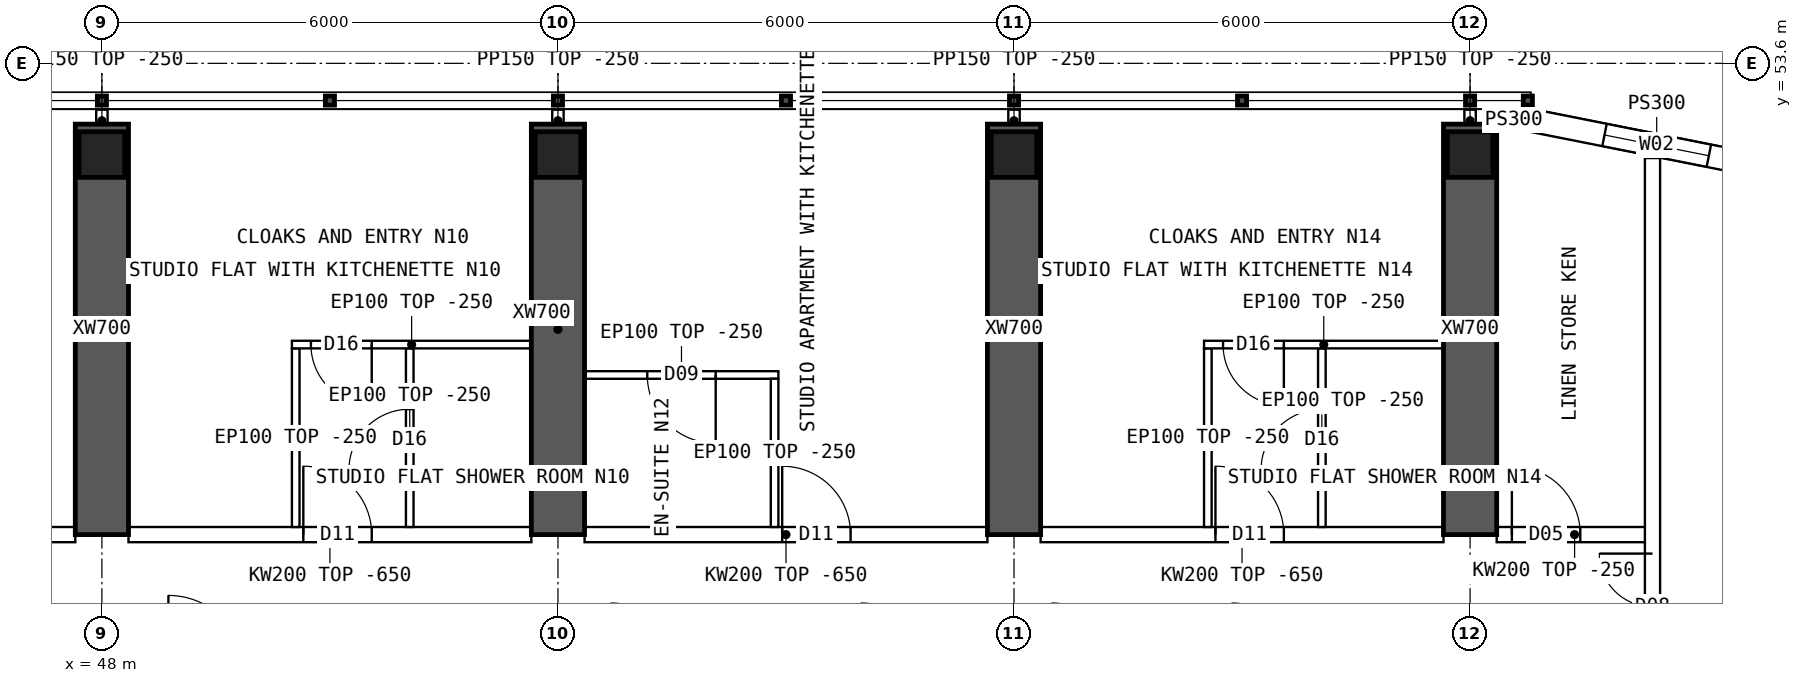
"""IFC4 building model, lengths in metres.
Left out: names, types, materials, properties, quantities, classifications, styles, units other than length and angle.
Written with IfcOpenShell. Run it as: python <this file> out.ifc"""

import sys

from ifc_helpers import new_model, si_unit, direction, frame, frame_2d, origin, origin_2d, place, context, subcontext, project, spatial, polyline, rectangle, hollow_rectangle, outline, extrude, element, fill, save


model = new_model("IFC4")
c1 = context("Model", 3, precision=1e-05, world=origin(), true_north=direction((0.0, 1.0)))
c2 = subcontext(c1, "Body", "Model", "MODEL_VIEW")
j1 = project(units=[si_unit("LENGTHUNIT", "METRE"), si_unit("PLANEANGLEUNIT", "RADIAN")], contexts=[c1])
p1 = place(None, origin())
s1 = spatial("IfcSite", under=j1, at=p1, CompositionType="ELEMENT")
p2 = place(p1, origin())
s2 = spatial("IfcBuilding", under=s1, at=p2, CompositionType="ELEMENT")
p3 = place(p2, frame((0.0, 0.0, 231.55)))
s3 = spatial("IfcBuildingStorey", under=s2, at=p3, CompositionType="ELEMENT", Elevation=231.55)
for number, where, z_axis, x_axis in (
    (1, (48.0, 52.4, 0.0), (0.0, 0.0, 1.0), (1.0, 0.0, 0.0)),
    (2, (54.0, 52.4, 0.0), (0.0, 0.0, 1.0), (1.0, 0.0, 0.0)),
    (3, (60.0, 52.4, 0.0), (0.0, 0.0, 1.0), (1.0, 0.0, 0.0)),
    (4, (66.0, 52.4, 0.0), (0.0, 0.0, 1.0), (1.0, 0.0, 0.0)),
):
    element("IfcColumn", number, at=place(p3, frame(where, z_axis=z_axis, x_axis=x_axis)), inside=s3, PredefinedType="COLUMN", context=c2, shape_type="SweptSolid", body=[
        extrude(hollow_rectangle(XDim=0.6, YDim=0.6, WallThickness=0.06, at=origin_2d()), origin(), (0.0, 0.0, 1.0), 3.75),
    ])
for number, where, z_axis, x_axis in (
    (5, (48.0, 47.4, 0.0), (0.0, 0.0, 1.0), (0.0, 1.0, 0.0)),
    (6, (54.0, 47.4, 0.0), (0.0, 0.0, 1.0), (0.0, 1.0, 0.0)),
    (7, (60.0, 47.4, 0.0), (0.0, 0.0, 1.0), (0.0, 1.0, 0.0)),
    (8, (66.0, 47.4, 0.0), (0.0, 0.0, 1.0), (0.0, 1.0, 0.0)),
):
    element("IfcWall", number, at=place(p3, frame(where, z_axis=z_axis, x_axis=x_axis)), inside=s3, PredefinedType="SHEAR", context=c2, shape_type="SweptSolid", body=[
        extrude(rectangle(XDim=5.4, YDim=0.7, at=frame_2d((2.7, 0.0))), origin(), (0.0, 0.0, 1.0), 3.75),
    ])
p4 = place(p3, frame((70.11, 52.192, 0.0), z_axis=(0.0, 0.0, 1.0), x_axis=(-0.98078325777, 0.195100490205, 0.0)))
e9 = element("IfcWall", 9, at=p4, inside=s3, PredefinedType="SOLIDWALL", context=c2, shape_type="SweptSolid", body=[
    extrude(outline(polyline([(-0.03, -0.15), (3.405, -0.15), (3.345, 0.15), (0.03, 0.15), (-0.03, -0.15)])), origin(), (0.0, 0.0, 1.0), 3.5),
])
p5 = place(p4, frame((0.988, 0.0, 0.9)))
e10 = element("IfcOpeningElement", 10, at=p5, cuts=e9, PredefinedType="OPENING", context=c2, shape_type="SweptSolid", body=[
    extrude(rectangle(XDim=1.4, YDim=1.8, at=frame_2d((0.7, 0.9))), frame((0.0, 0.16, 0.0), z_axis=(0.0, -1.0, 0.0), x_axis=(1.0, 0.0, 0.0)), (0.0, 0.0, 1.0), 0.32),
])
p6 = place(p3, frame((66.8, 52.85, 0.0), z_axis=(0.0, 0.0, 1.0), x_axis=(-1.0, 0.0, 0.0)))
e11 = element("IfcWall", 11, at=p6, inside=s3, PredefinedType="SOLIDWALL", context=c2, shape_type="SweptSolid", body=[
    extrude(rectangle(XDim=0.45, YDim=0.3, at=frame_2d((0.225, 0.0))), origin(), (0.0, 0.0, 1.0), 3.5),
])
p7 = place(p3, frame((42.35, 47.4, 0.0), z_axis=(0.0, 0.0, 1.0), x_axis=(1.0, 0.0, 0.0)))
e12 = element("IfcWall", 12, at=p7, inside=s3, PredefinedType="SOLIDWALL", context=c2, shape_type="SweptSolid", body=[
    extrude(outline(polyline([(0.0, 0.0), (5.3, 0.0), (5.3, 3.1), (0.0, 3.1), (0.0, 0.0)])), frame((0.0, 0.1, 0.0), z_axis=(0.0, -1.0, 0.0), x_axis=(1.0, 0.0, 0.0)), (0.0, 0.0, 1.0), 0.2),
])
p8 = place(p7, frame((2.6, 0.0, 0.0)))
e13 = element("IfcOpeningElement", 13, at=p8, cuts=e12, PredefinedType="OPENING", context=c2, shape_type="SweptSolid", body=[
    extrude(rectangle(XDim=0.9, YDim=2.1, at=frame_2d((0.45, 1.05))), frame((0.0, 0.11, 0.0), z_axis=(0.0, -1.0, 0.0), x_axis=(1.0, 0.0, 0.0)), (0.0, 0.0, 1.0), 0.22),
])
p9 = place(p3, frame((48.35, 47.4, 0.0), z_axis=(0.0, 0.0, 1.0), x_axis=(1.0, 0.0, 0.0)))
e14 = element("IfcWall", 14, at=p9, inside=s3, PredefinedType="SOLIDWALL", context=c2, shape_type="SweptSolid", body=[
    extrude(outline(polyline([(0.0, 0.0), (5.3, 0.0), (5.3, 3.1), (0.0, 3.1), (0.0, 0.0)])), frame((0.0, 0.1, 0.0), z_axis=(0.0, -1.0, 0.0), x_axis=(1.0, 0.0, 0.0)), (0.0, 0.0, 1.0), 0.2),
])
p10 = place(p9, frame((2.3, 0.0, 0.0)))
e15 = element("IfcOpeningElement", 15, at=p10, cuts=e14, PredefinedType="OPENING", context=c2, shape_type="SweptSolid", body=[
    extrude(rectangle(XDim=0.9, YDim=2.1, at=frame_2d((0.45, 1.05))), frame((0.0, 0.11, 0.0), z_axis=(0.0, -1.0, 0.0), x_axis=(1.0, 0.0, 0.0)), (0.0, 0.0, 1.0), 0.22),
])
p11 = place(p3, frame((54.35, 47.4, 0.0), z_axis=(0.0, 0.0, 1.0), x_axis=(1.0, 0.0, 0.0)))
e16 = element("IfcWall", 16, at=p11, inside=s3, PredefinedType="SOLIDWALL", context=c2, shape_type="SweptSolid", body=[
    extrude(outline(polyline([(0.0, 0.0), (5.3, 0.0), (5.3, 3.1), (0.0, 3.1), (0.0, 0.0)])), frame((0.0, 0.1, 0.0), z_axis=(0.0, -1.0, 0.0), x_axis=(1.0, 0.0, 0.0)), (0.0, 0.0, 1.0), 0.2),
])
p12 = place(p11, frame((2.6, 0.0, 0.0)))
e17 = element("IfcOpeningElement", 17, at=p12, cuts=e16, PredefinedType="OPENING", context=c2, shape_type="SweptSolid", body=[
    extrude(rectangle(XDim=0.9, YDim=2.1, at=frame_2d((0.45, 1.05))), frame((0.0, 0.11, 0.0), z_axis=(0.0, -1.0, 0.0), x_axis=(1.0, 0.0, 0.0)), (0.0, 0.0, 1.0), 0.22),
])
p13 = place(p3, frame((60.35, 47.4, 0.0), z_axis=(0.0, 0.0, 1.0), x_axis=(1.0, 0.0, 0.0)))
e18 = element("IfcWall", 18, at=p13, inside=s3, PredefinedType="SOLIDWALL", context=c2, shape_type="SweptSolid", body=[
    extrude(outline(polyline([(0.0, 0.0), (5.3, 0.0), (5.3, 3.1), (0.0, 3.1), (0.0, 0.0)])), frame((0.0, 0.1, 0.0), z_axis=(0.0, -1.0, 0.0), x_axis=(1.0, 0.0, 0.0)), (0.0, 0.0, 1.0), 0.2),
])
p14 = place(p13, frame((2.3, 0.0, 0.0)))
e19 = element("IfcOpeningElement", 19, at=p14, cuts=e18, PredefinedType="OPENING", context=c2, shape_type="SweptSolid", body=[
    extrude(rectangle(XDim=0.9, YDim=2.1, at=frame_2d((0.45, 1.05))), frame((0.0, 0.11, 0.0), z_axis=(0.0, -1.0, 0.0), x_axis=(1.0, 0.0, 0.0)), (0.0, 0.0, 1.0), 0.22),
])
p15 = place(p3, frame((66.35, 47.4, 0.0), z_axis=(0.0, 0.0, 1.0), x_axis=(1.0, 0.0, 0.0)))
e20 = element("IfcWall", 20, at=p15, inside=s3, PredefinedType="SOLIDWALL", context=c2, shape_type="SweptSolid", body=[
    extrude(rectangle(XDim=2.05, YDim=0.2, at=frame_2d((1.025, 0.0))), origin(), (0.0, 0.0, 1.0), 3.5),
])
p16 = place(p15, frame((0.2, 0.0, 0.0)))
e21 = element("IfcOpeningElement", 21, at=p16, cuts=e20, PredefinedType="OPENING", context=c2, shape_type="SweptSolid", body=[
    extrude(rectangle(XDim=0.9, YDim=2.1, at=frame_2d((0.45, 1.05))), frame((0.0, 0.11, 0.0), z_axis=(0.0, -1.0, 0.0), x_axis=(1.0, 0.0, 0.0)), (0.0, 0.0, 1.0), 0.22),
])
p17 = place(p3, frame((50.5, 49.9, 0.0), z_axis=(0.0, 0.0, 1.0), x_axis=(1.0, 0.0, 0.0)))
e22 = element("IfcWall", 22, at=p17, inside=s3, PredefinedType="PARTITIONING", context=c2, shape_type="SweptSolid", body=[
    extrude(rectangle(XDim=3.15, YDim=0.1, at=frame_2d((1.575, 0.0))), origin(), (0.0, 0.0, 1.0), 3.5),
])
p18 = place(p17, frame((0.25, 0.0, 0.0)))
e23 = element("IfcOpeningElement", 23, at=p18, cuts=e22, PredefinedType="OPENING", context=c2, shape_type="SweptSolid", body=[
    extrude(rectangle(XDim=0.8, YDim=2.1, at=frame_2d((0.4, 1.05))), frame((0.0, 0.06, 0.0), z_axis=(0.0, -1.0, 0.0), x_axis=(1.0, 0.0, 0.0)), (0.0, 0.0, 1.0), 0.12),
])
p19 = place(p3, frame((50.55, 49.85, 0.0), z_axis=(0.0, 0.0, 1.0), x_axis=(0.0, -1.0, 0.0)))
e24 = element("IfcWall", 24, at=p19, inside=s3, PredefinedType="PARTITIONING", context=c2, shape_type="SweptSolid", body=[
    extrude(outline(polyline([(0.0, 0.0), (2.35, 0.0), (2.35, 3.1), (2.302, 3.1), (2.3, 3.5), (0.0, 3.5), (0.0, 0.0)])), frame((0.0, 0.05, 0.0), z_axis=(0.0, -1.0, 0.0), x_axis=(1.0, 0.0, 0.0)), (0.0, 0.0, 1.0), 0.1),
])
p20 = place(p3, frame((52.05, 49.85, 0.0), z_axis=(0.0, 0.0, 1.0), x_axis=(0.0, -1.0, 0.0)))
e25 = element("IfcWall", 25, at=p20, inside=s3, PredefinedType="PARTITIONING", context=c2, shape_type="SweptSolid", body=[
    extrude(outline(polyline([(0.0, 0.0), (2.35, 0.0), (2.35, 3.1), (2.302, 3.1), (2.3, 3.5), (0.0, 3.5), (0.0, 0.0)])), frame((0.0, 0.05, 0.0), z_axis=(0.0, -1.0, 0.0), x_axis=(1.0, 0.0, 0.0)), (0.0, 0.0, 1.0), 0.1),
])
p21 = place(p20, frame((0.8, 0.0, 0.0)))
e26 = element("IfcOpeningElement", 26, at=p21, cuts=e25, PredefinedType="OPENING", context=c2, shape_type="SweptSolid", body=[
    extrude(rectangle(XDim=0.8, YDim=2.1, at=frame_2d((0.4, 1.05))), frame((0.0, 0.06, 0.0), z_axis=(0.0, -1.0, 0.0), x_axis=(1.0, 0.0, 0.0)), (0.0, 0.0, 1.0), 0.12),
])
p22 = place(p3, frame((54.35, 49.5, 0.0), z_axis=(0.0, 0.0, 1.0), x_axis=(1.0, 0.0, 0.0)))
e27 = element("IfcWall", 27, at=p22, inside=s3, PredefinedType="PARTITIONING", context=c2, shape_type="SweptSolid", body=[
    extrude(rectangle(XDim=2.55, YDim=0.1, at=frame_2d((1.275, 0.0))), origin(), (0.0, 0.0, 1.0), 3.5),
])
p23 = place(p22, frame((0.825, 0.0, 0.0)))
e28 = element("IfcOpeningElement", 28, at=p23, cuts=e27, PredefinedType="OPENING", context=c2, shape_type="SweptSolid", body=[
    extrude(rectangle(XDim=0.9, YDim=2.1, at=frame_2d((0.45, 1.05))), frame((0.0, 0.06, 0.0), z_axis=(0.0, -1.0, 0.0), x_axis=(1.0, 0.0, 0.0)), (0.0, 0.0, 1.0), 0.12),
])
p24 = place(p3, frame((56.85, 49.45, 0.0), z_axis=(0.0, 0.0, 1.0), x_axis=(0.0, -1.0, 0.0)))
e29 = element("IfcWall", 29, at=p24, inside=s3, PredefinedType="PARTITIONING", context=c2, shape_type="SweptSolid", body=[
    extrude(outline(polyline([(0.0, 0.0), (1.95, 0.0), (1.95, 3.1), (1.902, 3.1), (1.9, 3.5), (0.0, 3.5), (0.0, 0.0)])), frame((0.0, 0.05, 0.0), z_axis=(0.0, -1.0, 0.0), x_axis=(1.0, 0.0, 0.0)), (0.0, 0.0, 1.0), 0.1),
])
p25 = place(p3, frame((62.5, 49.9, 0.0), z_axis=(0.0, 0.0, 1.0), x_axis=(1.0, 0.0, 0.0)))
e30 = element("IfcWall", 30, at=p25, inside=s3, PredefinedType="PARTITIONING", context=c2, shape_type="SweptSolid", body=[
    extrude(rectangle(XDim=3.15, YDim=0.1, at=frame_2d((1.575, 0.0))), origin(), (0.0, 0.0, 1.0), 3.5),
])
p26 = place(p25, frame((0.25, 0.0, 0.0)))
e31 = element("IfcOpeningElement", 31, at=p26, cuts=e30, PredefinedType="OPENING", context=c2, shape_type="SweptSolid", body=[
    extrude(rectangle(XDim=0.8, YDim=2.1, at=frame_2d((0.4, 1.05))), frame((0.0, 0.06, 0.0), z_axis=(0.0, -1.0, 0.0), x_axis=(1.0, 0.0, 0.0)), (0.0, 0.0, 1.0), 0.12),
])
p27 = place(p3, frame((62.55, 49.85, 0.0), z_axis=(0.0, 0.0, 1.0), x_axis=(0.0, -1.0, 0.0)))
e32 = element("IfcWall", 32, at=p27, inside=s3, PredefinedType="PARTITIONING", context=c2, shape_type="SweptSolid", body=[
    extrude(outline(polyline([(0.0, 0.0), (2.35, 0.0), (2.35, 3.1), (2.302, 3.1), (2.3, 3.5), (0.0, 3.5), (0.0, 0.0)])), frame((0.0, 0.05, 0.0), z_axis=(0.0, -1.0, 0.0), x_axis=(1.0, 0.0, 0.0)), (0.0, 0.0, 1.0), 0.1),
])
p28 = place(p3, frame((64.05, 49.85, 0.0), z_axis=(0.0, 0.0, 1.0), x_axis=(0.0, -1.0, 0.0)))
e33 = element("IfcWall", 33, at=p28, inside=s3, PredefinedType="PARTITIONING", context=c2, shape_type="SweptSolid", body=[
    extrude(outline(polyline([(0.0, 0.0), (2.35, 0.0), (2.35, 3.1), (2.302, 3.1), (2.3, 3.5), (0.0, 3.5), (0.0, 0.0)])), frame((0.0, 0.05, 0.0), z_axis=(0.0, -1.0, 0.0), x_axis=(1.0, 0.0, 0.0)), (0.0, 0.0, 1.0), 0.1),
])
p29 = place(p28, frame((0.8, 0.0, 0.0)))
e34 = element("IfcOpeningElement", 34, at=p29, cuts=e33, PredefinedType="OPENING", context=c2, shape_type="SweptSolid", body=[
    extrude(rectangle(XDim=0.8, YDim=2.1, at=frame_2d((0.4, 1.05))), frame((0.0, 0.06, 0.0), z_axis=(0.0, -1.0, 0.0), x_axis=(1.0, 0.0, 0.0)), (0.0, 0.0, 1.0), 0.12),
])
p30 = place(p3, frame((68.4, 11.646, 0.0), z_axis=(0.0, 0.0, 1.0), x_axis=(0.0, 1.0, 0.0)))
e35 = element("IfcWall", 35, at=p30, inside=s3, PredefinedType="SOLIDWALL", context=c2, shape_type="SweptSolid", body=[
    extrude(rectangle(XDim=40.708, YDim=0.2, at=frame_2d((20.354, 0.0))), origin(), (0.0, 0.0, 1.0), 3.5),
])
p31 = place(p30, frame((13.434, 0.0, 0.0)))
e36 = element("IfcOpeningElement", 36, at=p31, cuts=e35, PredefinedType="OPENING", context=c2, shape_type="SweptSolid", body=[
    extrude(rectangle(XDim=1.2, YDim=2.1, at=frame_2d((0.6, 1.05))), frame((0.0, 0.11, 0.0), z_axis=(0.0, -1.0, 0.0), x_axis=(1.0, 0.0, 0.0)), (0.0, 0.0, 1.0), 0.22),
])
p32 = place(p30, frame((21.194, 0.0, 0.0)))
e37 = element("IfcOpeningElement", 37, at=p32, cuts=e35, PredefinedType="OPENING", context=c2, shape_type="SweptSolid", body=[
    extrude(rectangle(XDim=1.2, YDim=2.1, at=frame_2d((0.6, 1.05))), frame((0.0, 0.11, 0.0), z_axis=(0.0, -1.0, 0.0), x_axis=(1.0, 0.0, 0.0)), (0.0, 0.0, 1.0), 0.22),
])
p33 = place(p30, frame((5.104, 0.0, 0.0)))
e38 = element("IfcOpeningElement", 38, at=p33, cuts=e35, PredefinedType="OPENING", context=c2, shape_type="SweptSolid", body=[
    extrude(rectangle(XDim=1.4, YDim=2.1, at=frame_2d((0.7, 1.05))), frame((0.0, 0.11, 0.0), z_axis=(0.0, -1.0, 0.0), x_axis=(1.0, 0.0, 0.0)), (0.0, 0.0, 1.0), 0.22),
])
p34 = place(p30, frame((34.104, 0.0, 0.0)))
e39 = element("IfcOpeningElement", 39, at=p34, cuts=e35, PredefinedType="OPENING", context=c2, shape_type="SweptSolid", body=[
    extrude(rectangle(XDim=1.4, YDim=2.1, at=frame_2d((0.7, 1.05))), frame((0.0, 0.11, 0.0), z_axis=(0.0, -1.0, 0.0), x_axis=(1.0, 0.0, 0.0)), (0.0, 0.0, 1.0), 0.22),
])
for number, where, z_axis, x_axis in (
    (40, (48.0, 52.7, 0.0), (0.0, 0.0, 1.0), (0.0, 1.0, 0.0)),
    (41, (54.0, 52.7, 0.0), (0.0, 0.0, 1.0), (0.0, 1.0, 0.0)),
    (42, (60.0, 52.7, 0.0), (0.0, 0.0, 1.0), (0.0, 1.0, 0.0)),
    (43, (66.0, 52.7, 0.0), (0.0, 0.0, 1.0), (0.0, 1.0, 0.0)),
):
    element("IfcWall", number, at=place(p3, frame(where, z_axis=z_axis, x_axis=x_axis)), inside=s3, PredefinedType="PARTITIONING", context=c2, shape_type="SweptSolid", body=[
        extrude(rectangle(XDim=0.29, YDim=0.15, at=frame_2d((0.145, 0.0))), origin(), (0.0, 0.0, 1.0), 3.5),
    ])
p35 = place(p5, origin())
e44 = element("IfcWindow", 44, at=p35, inside=s3, PartitioningType="SINGLE_PANEL", PredefinedType="WINDOW", context=c2, shape_type="SweptSolid", body=[
    extrude(rectangle(XDim=1.4, YDim=1.8, at=frame_2d((0.7, 0.9))), frame((0.0, 0.03, 0.0), z_axis=(0.0, -1.0, 0.0), x_axis=(1.0, 0.0, 0.0)), (0.0, 0.0, 1.0), 0.06),
])
fill(e10, e44)
p36 = place(p18, origin())
e45 = element("IfcDoor", 45, at=p36, inside=s3, OperationType="SINGLE_SWING_RIGHT", PredefinedType="DOOR", context=c2, shape_type="SweptSolid", body=[
    extrude(rectangle(XDim=0.8, YDim=2.1, at=frame_2d((0.4, 1.05))), frame((0.0, 0.025, 0.0), z_axis=(0.0, -1.0, 0.0), x_axis=(1.0, 0.0, 0.0)), (0.0, 0.0, 1.0), 0.05),
])
fill(e23, e45)
p37 = place(p21, origin())
e46 = element("IfcDoor", 46, at=p37, inside=s3, OperationType="SINGLE_SWING_RIGHT", PredefinedType="DOOR", context=c2, shape_type="SweptSolid", body=[
    extrude(rectangle(XDim=0.8, YDim=2.1, at=frame_2d((0.4, 1.05))), frame((0.0, 0.025, 0.0), z_axis=(0.0, -1.0, 0.0), x_axis=(1.0, 0.0, 0.0)), (0.0, 0.0, 1.0), 0.05),
])
fill(e26, e46)
p38 = place(p10, origin())
e47 = element("IfcDoor", 47, at=p38, inside=s3, OperationType="SINGLE_SWING_LEFT", PredefinedType="DOOR", context=c2, shape_type="SweptSolid", body=[
    extrude(rectangle(XDim=0.9, YDim=2.1, at=frame_2d((0.45, 1.05))), frame((0.0, 0.025, 0.0), z_axis=(0.0, -1.0, 0.0), x_axis=(1.0, 0.0, 0.0)), (0.0, 0.0, 1.0), 0.05),
])
fill(e15, e47)
p39 = place(p23, origin())
e48 = element("IfcDoor", 48, at=p39, inside=s3, OperationType="SINGLE_SWING_RIGHT", PredefinedType="DOOR", context=c2, shape_type="SweptSolid", body=[
    extrude(rectangle(XDim=0.9, YDim=2.1, at=frame_2d((0.45, 1.05))), frame((0.0, 0.025, 0.0), z_axis=(0.0, -1.0, 0.0), x_axis=(1.0, 0.0, 0.0)), (0.0, 0.0, 1.0), 0.05),
])
fill(e28, e48)
p40 = place(p12, origin())
e49 = element("IfcDoor", 49, at=p40, inside=s3, OperationType="SINGLE_SWING_LEFT", PredefinedType="DOOR", context=c2, shape_type="SweptSolid", body=[
    extrude(rectangle(XDim=0.9, YDim=2.1, at=frame_2d((0.45, 1.05))), frame((0.0, 0.025, 0.0), z_axis=(0.0, -1.0, 0.0), x_axis=(1.0, 0.0, 0.0)), (0.0, 0.0, 1.0), 0.05),
])
fill(e17, e49)
p41 = place(p26, origin())
e50 = element("IfcDoor", 50, at=p41, inside=s3, OperationType="SINGLE_SWING_RIGHT", PredefinedType="DOOR", context=c2, shape_type="SweptSolid", body=[
    extrude(rectangle(XDim=0.8, YDim=2.1, at=frame_2d((0.4, 1.05))), frame((0.0, 0.025, 0.0), z_axis=(0.0, -1.0, 0.0), x_axis=(1.0, 0.0, 0.0)), (0.0, 0.0, 1.0), 0.05),
])
fill(e31, e50)
p42 = place(p29, origin())
e51 = element("IfcDoor", 51, at=p42, inside=s3, OperationType="SINGLE_SWING_RIGHT", PredefinedType="DOOR", context=c2, shape_type="SweptSolid", body=[
    extrude(rectangle(XDim=0.8, YDim=2.1, at=frame_2d((0.4, 1.05))), frame((0.0, 0.025, 0.0), z_axis=(0.0, -1.0, 0.0), x_axis=(1.0, 0.0, 0.0)), (0.0, 0.0, 1.0), 0.05),
])
fill(e34, e51)
p43 = place(p14, origin())
e52 = element("IfcDoor", 52, at=p43, inside=s3, OperationType="SINGLE_SWING_LEFT", PredefinedType="DOOR", context=c2, shape_type="SweptSolid", body=[
    extrude(rectangle(XDim=0.9, YDim=2.1, at=frame_2d((0.45, 1.05))), frame((0.0, 0.025, 0.0), z_axis=(0.0, -1.0, 0.0), x_axis=(1.0, 0.0, 0.0)), (0.0, 0.0, 1.0), 0.05),
])
fill(e19, e52)
p44 = place(p34, origin())
e53 = element("IfcDoor", 53, at=p44, inside=s3, OperationType="DOUBLE_DOOR_SINGLE_SWING", PredefinedType="DOOR", context=c2, shape_type="SweptSolid", body=[
    extrude(rectangle(XDim=1.4, YDim=2.1, at=frame_2d((0.7, 1.05))), frame((0.0, 0.025, 0.0), z_axis=(0.0, -1.0, 0.0), x_axis=(1.0, 0.0, 0.0)), (0.0, 0.0, 1.0), 0.05),
])
fill(e39, e53)
p45 = place(p16, origin())
e54 = element("IfcDoor", 54, at=p45, inside=s3, OperationType="SINGLE_SWING_LEFT", PredefinedType="DOOR", context=c2, shape_type="SweptSolid", body=[
    extrude(rectangle(XDim=0.9, YDim=2.1, at=frame_2d((0.45, 1.05))), frame((0.0, 0.025, 0.0), z_axis=(0.0, -1.0, 0.0), x_axis=(1.0, 0.0, 0.0)), (0.0, 0.0, 1.0), 0.05),
])
fill(e21, e54)
save(model, sys.argv[1])
